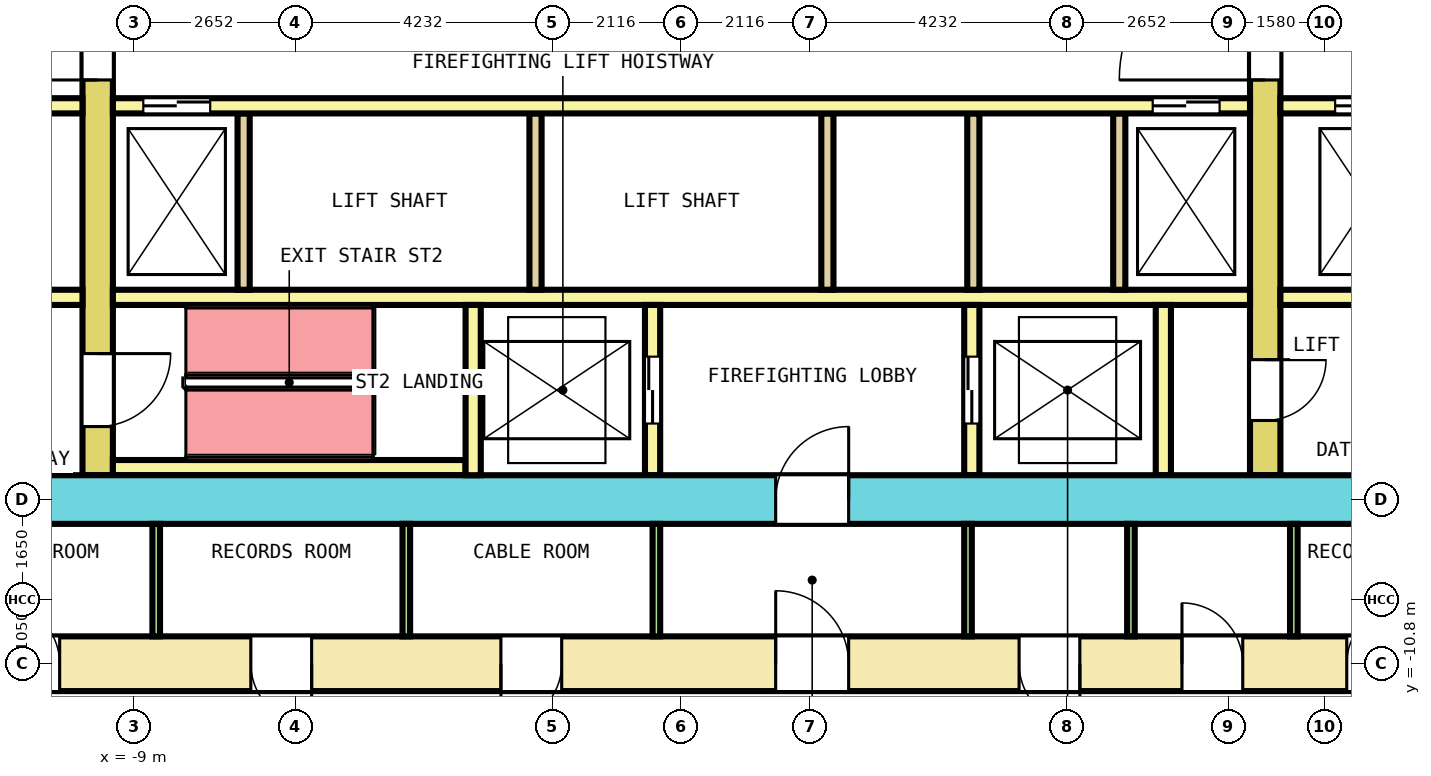
"""IFC4 building model, lengths in metres.
Left out: names, types, materials, properties, quantities, classifications, styles, units other than length and angle.
Written with IfcOpenShell. Run it as: python <this file> out.ifc"""

import sys

from ifc_helpers import new_model, si_unit, direction, frame, frame_2d, origin, place, context, subcontext, project, spatial, rectangle, extrude, element, fill, save


model = new_model("IFC4")
c1 = context("Model", 3, precision=1e-05, world=origin(), true_north=direction((0.0, 1.0)))
c2 = subcontext(c1, "Body", "Model", "MODEL_VIEW")
j1 = project(units=[si_unit("LENGTHUNIT", "METRE"), si_unit("PLANEANGLEUNIT", "RADIAN")], contexts=[c1])
p1 = place(None, origin())
s1 = spatial("IfcSite", under=j1, at=p1, CompositionType="ELEMENT")
p2 = place(p1, origin())
s2 = spatial("IfcBuilding", under=s1, at=p2, CompositionType="ELEMENT")
p3 = place(p2, frame((0.0, 0.0, 14.6)))
s3 = spatial("IfcBuildingStorey", under=s2, at=p3, CompositionType="ELEMENT", Elevation=14.6)
p4 = place(p3, frame((-13.65, -10.8, 0.0), z_axis=(0.0, 0.0, 1.0), x_axis=(1.0, 0.0, 0.0)))
e1 = element("IfcWall", 1, at=p4, inside=s3, PredefinedType="SHEAR", context=c2, shape_type="SweptSolid", body=[
    extrude(rectangle(XDim=27.3, YDim=0.9, at=frame_2d((13.65, 0.0))), origin(), (0.0, 0.0, 1.0), 4.1),
])
p5 = place(p4, frame((2.425, 0.0, 0.0)))
e2 = element("IfcOpeningElement", 2, at=p5, cuts=e1, PredefinedType="OPENING", context=c2, shape_type="SweptSolid", body=[
    extrude(rectangle(XDim=1.0, YDim=2.1, at=frame_2d((0.5, 1.05))), frame((0.0, 0.46, 0.0), z_axis=(0.0, -1.0, 0.0), x_axis=(1.0, 0.0, 0.0)), (0.0, 0.0, 1.0), 0.92),
])
p6 = place(p4, frame((6.569, 0.0, 0.0)))
e3 = element("IfcOpeningElement", 3, at=p6, cuts=e1, PredefinedType="OPENING", context=c2, shape_type="SweptSolid", body=[
    extrude(rectangle(XDim=1.0, YDim=2.1, at=frame_2d((0.5, 1.05))), frame((0.0, 0.46, 0.0), z_axis=(0.0, -1.0, 0.0), x_axis=(1.0, 0.0, 0.0)), (0.0, 0.0, 1.0), 0.92),
])
p7 = place(p4, frame((10.681, 0.0, 0.0)))
e4 = element("IfcOpeningElement", 4, at=p7, cuts=e1, PredefinedType="OPENING", context=c2, shape_type="SweptSolid", body=[
    extrude(rectangle(XDim=1.0, YDim=2.1, at=frame_2d((0.5, 1.05))), frame((0.0, 0.46, 0.0), z_axis=(0.0, -1.0, 0.0), x_axis=(1.0, 0.0, 0.0)), (0.0, 0.0, 1.0), 0.92),
])
p8 = place(p4, frame((19.202, 0.0, 0.0)))
e5 = element("IfcOpeningElement", 5, at=p8, cuts=e1, PredefinedType="OPENING", context=c2, shape_type="SweptSolid", body=[
    extrude(rectangle(XDim=1.0, YDim=2.1, at=frame_2d((0.5, 1.05))), frame((0.0, 0.46, 0.0), z_axis=(0.0, -1.0, 0.0), x_axis=(1.0, 0.0, 0.0)), (0.0, 0.0, 1.0), 0.92),
])
p9 = place(p4, frame((21.881, 0.0, 0.0)))
e6 = element("IfcOpeningElement", 6, at=p9, cuts=e1, PredefinedType="OPENING", context=c2, shape_type="SweptSolid", body=[
    extrude(rectangle(XDim=1.0, YDim=2.1, at=frame_2d((0.5, 1.05))), frame((0.0, 0.46, 0.0), z_axis=(0.0, -1.0, 0.0), x_axis=(1.0, 0.0, 0.0)), (0.0, 0.0, 1.0), 0.92),
])
p10 = place(p4, frame((24.592, 0.0, 0.0)))
e7 = element("IfcOpeningElement", 7, at=p10, cuts=e1, PredefinedType="OPENING", context=c2, shape_type="SweptSolid", body=[
    extrude(rectangle(XDim=1.0, YDim=2.1, at=frame_2d((0.5, 1.05))), frame((0.0, 0.46, 0.0), z_axis=(0.0, -1.0, 0.0), x_axis=(1.0, 0.0, 0.0)), (0.0, 0.0, 1.0), 0.92),
])
p11 = place(p4, frame((15.2, 0.0, 0.0)))
e8 = element("IfcOpeningElement", 8, at=p11, cuts=e1, PredefinedType="OPENING", context=c2, shape_type="SweptSolid", body=[
    extrude(rectangle(XDim=1.2, YDim=2.1, at=frame_2d((0.6, 1.05))), frame((0.0, 0.46, 0.0), z_axis=(0.0, -1.0, 0.0), x_axis=(1.0, 0.0, 0.0)), (0.0, 0.0, 1.0), 0.92),
])
p12 = place(p3, frame((-12.75, -8.1, 0.0), z_axis=(0.0, 0.0, 1.0), x_axis=(1.0, 0.0, 0.0)))
e9 = element("IfcWall", 9, at=p12, inside=s3, PredefinedType="SHEAR", context=c2, shape_type="SweptSolid", body=[
    extrude(rectangle(XDim=25.5, YDim=0.8, at=frame_2d((12.75, 0.0))), origin(), (0.0, 0.0, 1.0), 4.1),
])
p13 = place(p12, frame((14.3, 0.0, 0.0)))
e10 = element("IfcOpeningElement", 10, at=p13, cuts=e9, PredefinedType="OPENING", context=c2, shape_type="SweptSolid", body=[
    extrude(rectangle(XDim=1.2, YDim=2.1, at=frame_2d((0.6, 1.05))), frame((0.0, 0.41, 0.0), z_axis=(0.0, -1.0, 0.0), x_axis=(1.0, 0.0, 0.0)), (0.0, 0.0, 1.0), 0.82),
])
p14 = place(p3, frame((-9.6, -7.7, 0.0), z_axis=(0.0, 0.0, 1.0), x_axis=(0.0, 1.0, 0.0)))
e11 = element("IfcWall", 11, at=p14, inside=s3, PredefinedType="SHEAR", context=c2, shape_type="SweptSolid", body=[
    extrude(rectangle(XDim=15.4, YDim=0.5, at=frame_2d((7.7, 0.0))), origin(), (0.0, 0.0, 1.0), 4.1),
])
p15 = place(p14, frame((6.5, 0.0, 0.0)))
e12 = element("IfcOpeningElement", 12, at=p15, cuts=e11, PredefinedType="OPENING", context=c2, shape_type="SweptSolid", body=[
    extrude(rectangle(XDim=2.4, YDim=2.1, at=frame_2d((1.2, 1.05))), frame((0.0, 0.26, 0.0), z_axis=(0.0, -1.0, 0.0), x_axis=(1.0, 0.0, 0.0)), (0.0, 0.0, 1.0), 0.52),
])
p16 = place(p14, frame((13.4, 0.0, 0.0)))
e13 = element("IfcOpeningElement", 13, at=p16, cuts=e11, PredefinedType="OPENING", context=c2, shape_type="SweptSolid", body=[
    extrude(rectangle(XDim=1.2, YDim=2.1, at=frame_2d((0.6, 1.05))), frame((0.0, 0.26, 0.0), z_axis=(0.0, -1.0, 0.0), x_axis=(1.0, 0.0, 0.0)), (0.0, 0.0, 1.0), 0.52),
])
p17 = place(p14, frame((0.8, 0.0, 0.0)))
e14 = element("IfcOpeningElement", 14, at=p17, cuts=e11, PredefinedType="OPENING", context=c2, shape_type="SweptSolid", body=[
    extrude(rectangle(XDim=1.2, YDim=2.1, at=frame_2d((0.6, 1.05))), frame((0.0, 0.26, 0.0), z_axis=(0.0, -1.0, 0.0), x_axis=(1.0, 0.0, 0.0)), (0.0, 0.0, 1.0), 0.52),
])
p18 = place(p3, frame((9.6, -7.7, 0.0), z_axis=(0.0, 0.0, 1.0), x_axis=(0.0, 1.0, 0.0)))
e15 = element("IfcWall", 15, at=p18, inside=s3, PredefinedType="SHEAR", context=c2, shape_type="SweptSolid", body=[
    extrude(rectangle(XDim=15.4, YDim=0.5, at=frame_2d((7.7, 0.0))), origin(), (0.0, 0.0, 1.0), 4.1),
])
p19 = place(p18, frame((6.5, 0.0, 0.0)))
e16 = element("IfcOpeningElement", 16, at=p19, cuts=e15, PredefinedType="OPENING", context=c2, shape_type="SweptSolid", body=[
    extrude(rectangle(XDim=2.4, YDim=2.1, at=frame_2d((1.2, 1.05))), frame((0.0, 0.26, 0.0), z_axis=(0.0, -1.0, 0.0), x_axis=(1.0, 0.0, 0.0)), (0.0, 0.0, 1.0), 0.52),
])
p20 = place(p18, frame((13.4, 0.0, 0.0)))
e17 = element("IfcOpeningElement", 17, at=p20, cuts=e15, PredefinedType="OPENING", context=c2, shape_type="SweptSolid", body=[
    extrude(rectangle(XDim=1.2, YDim=2.1, at=frame_2d((0.6, 1.05))), frame((0.0, 0.26, 0.0), z_axis=(0.0, -1.0, 0.0), x_axis=(1.0, 0.0, 0.0)), (0.0, 0.0, 1.0), 0.52),
])
p21 = place(p18, frame((0.9, 0.0, 0.0)))
e18 = element("IfcOpeningElement", 18, at=p21, cuts=e15, PredefinedType="OPENING", context=c2, shape_type="SweptSolid", body=[
    extrude(rectangle(XDim=1.0, YDim=2.1, at=frame_2d((0.5, 1.05))), frame((0.0, 0.26, 0.0), z_axis=(0.0, -1.0, 0.0), x_axis=(1.0, 0.0, 0.0)), (0.0, 0.0, 1.0), 0.52),
])
p22 = place(p3, frame((-12.75, -1.625, 0.0), z_axis=(0.0, 0.0, 1.0), x_axis=(1.0, 0.0, 0.0)))
e19 = element("IfcWall", 19, at=p22, inside=s3, PredefinedType="SOLIDWALL", context=c2, shape_type="SweptSolid", body=[
    extrude(rectangle(XDim=2.9, YDim=0.25, at=frame_2d((1.45, 0.0))), origin(), (0.0, 0.0, 1.0), 4.1),
])
p23 = place(p22, frame((0.9, 0.0, 0.0)))
e20 = element("IfcOpeningElement", 20, at=p23, cuts=e19, PredefinedType="OPENING", context=c2, shape_type="SweptSolid", body=[
    extrude(rectangle(XDim=1.1, YDim=2.1, at=frame_2d((0.55, 1.05))), frame((0.0, 0.135, 0.0), z_axis=(0.0, -1.0, 0.0), x_axis=(1.0, 0.0, 0.0)), (0.0, 0.0, 1.0), 0.27),
])
p24 = place(p3, frame((-9.35, -1.625, 0.0), z_axis=(0.0, 0.0, 1.0), x_axis=(1.0, 0.0, 0.0)))
e21 = element("IfcWall", 21, at=p24, inside=s3, PredefinedType="SOLIDWALL", context=c2, shape_type="SweptSolid", body=[
    extrude(rectangle(XDim=18.7, YDim=0.25, at=frame_2d((9.35, 0.0))), origin(), (0.0, 0.0, 1.0), 4.1),
])
p25 = place(p24, frame((0.5, 0.0, 0.0)))
e22 = element("IfcOpeningElement", 22, at=p25, cuts=e21, PredefinedType="OPENING", context=c2, shape_type="SweptSolid", body=[
    extrude(rectangle(XDim=1.1, YDim=2.1, at=frame_2d((0.55, 1.05))), frame((0.0, 0.135, 0.0), z_axis=(0.0, -1.0, 0.0), x_axis=(1.0, 0.0, 0.0)), (0.0, 0.0, 1.0), 0.27),
])
p26 = place(p24, frame((17.1, 0.0, 0.0)))
e23 = element("IfcOpeningElement", 23, at=p26, cuts=e21, PredefinedType="OPENING", context=c2, shape_type="SweptSolid", body=[
    extrude(rectangle(XDim=1.1, YDim=2.1, at=frame_2d((0.55, 1.05))), frame((0.0, 0.135, 0.0), z_axis=(0.0, -1.0, 0.0), x_axis=(1.0, 0.0, 0.0)), (0.0, 0.0, 1.0), 0.27),
])
p27 = place(p3, frame((9.85, -1.625, 0.0), z_axis=(0.0, 0.0, 1.0), x_axis=(1.0, 0.0, 0.0)))
e24 = element("IfcWall", 24, at=p27, inside=s3, PredefinedType="SOLIDWALL", context=c2, shape_type="SweptSolid", body=[
    extrude(rectangle(XDim=2.9, YDim=0.25, at=frame_2d((1.45, 0.0))), origin(), (0.0, 0.0, 1.0), 4.1),
])
p28 = place(p27, frame((0.9, 0.0, 0.0)))
e25 = element("IfcOpeningElement", 25, at=p28, cuts=e24, PredefinedType="OPENING", context=c2, shape_type="SweptSolid", body=[
    extrude(rectangle(XDim=1.1, YDim=2.1, at=frame_2d((0.55, 1.05))), frame((0.0, 0.135, 0.0), z_axis=(0.0, -1.0, 0.0), x_axis=(1.0, 0.0, 0.0)), (0.0, 0.0, 1.0), 0.27),
])
p29 = place(p3, frame((-12.75, -4.775, 0.0), z_axis=(0.0, 0.0, 1.0), x_axis=(1.0, 0.0, 0.0)))
e26 = element("IfcWall", 26, at=p29, inside=s3, PredefinedType="SOLIDWALL", context=c2, shape_type="SweptSolid", body=[
    extrude(rectangle(XDim=2.9, YDim=0.25, at=frame_2d((1.45, 0.0))), origin(), (0.0, 0.0, 1.0), 4.1),
])
p30 = place(p3, frame((-9.35, -4.775, 0.0), z_axis=(0.0, 0.0, 1.0), x_axis=(1.0, 0.0, 0.0)))
e27 = element("IfcWall", 27, at=p30, inside=s3, PredefinedType="SOLIDWALL", context=c2, shape_type="SweptSolid", body=[
    extrude(rectangle(XDim=18.7, YDim=0.25, at=frame_2d((9.35, 0.0))), origin(), (0.0, 0.0, 1.0), 4.1),
])
p31 = place(p3, frame((9.85, -4.775, 0.0), z_axis=(0.0, 0.0, 1.0), x_axis=(1.0, 0.0, 0.0)))
e28 = element("IfcWall", 28, at=p31, inside=s3, PredefinedType="SOLIDWALL", context=c2, shape_type="SweptSolid", body=[
    extrude(rectangle(XDim=2.9, YDim=0.25, at=frame_2d((1.45, 0.0))), origin(), (0.0, 0.0, 1.0), 4.1),
])
for number, where, z_axis, x_axis in (
    (29, (-7.2, -4.65, 0.0), (0.0, 0.0, 1.0), (0.0, 1.0, 0.0)),
    (30, (-2.4, -4.65, 0.0), (0.0, 0.0, 1.0), (0.0, 1.0, 0.0)),
    (31, (2.4, -4.65, 0.0), (0.0, 0.0, 1.0), (0.0, 1.0, 0.0)),
    (32, (4.8, -4.65, 0.0), (0.0, 0.0, 1.0), (0.0, 1.0, 0.0)),
    (33, (7.2, -4.65, 0.0), (0.0, 0.0, 1.0), (0.0, 1.0, 0.0)),
):
    element("IfcWall", number, at=place(p3, frame(where, z_axis=z_axis, x_axis=x_axis)), inside=s3, PredefinedType="SOLIDWALL", context=c2, shape_type="SweptSolid", body=[
        extrude(rectangle(XDim=2.9, YDim=0.2, at=frame_2d((1.45, 0.0))), origin(), (0.0, 0.0, 1.0), 4.1),
    ])
p32 = place(p3, frame((-9.35, -7.575, 0.0), z_axis=(0.0, 0.0, 1.0), x_axis=(1.0, 0.0, 0.0)))
e34 = element("IfcWall", 34, at=p32, inside=s3, PredefinedType="SOLIDWALL", context=c2, shape_type="SweptSolid", body=[
    extrude(rectangle(XDim=5.8, YDim=0.25, at=frame_2d((2.9, 0.0))), origin(), (0.0, 0.0, 1.0), 4.1),
])
p33 = place(p3, frame((-3.425, -7.7, 0.0), z_axis=(0.0, 0.0, 1.0), x_axis=(0.0, 1.0, 0.0)))
e35 = element("IfcWall", 35, at=p33, inside=s3, PredefinedType="SOLIDWALL", context=c2, shape_type="SweptSolid", body=[
    extrude(rectangle(XDim=2.8, YDim=0.25, at=frame_2d((1.4, 0.0))), origin(), (0.0, 0.0, 1.0), 4.1),
])
p34 = place(p3, frame((-0.475, -7.7, 0.0), z_axis=(0.0, 0.0, 1.0), x_axis=(0.0, 1.0, 0.0)))
e36 = element("IfcWall", 36, at=p34, inside=s3, PredefinedType="SOLIDWALL", context=c2, shape_type="SweptSolid", body=[
    extrude(rectangle(XDim=2.8, YDim=0.25, at=frame_2d((1.4, 0.0))), origin(), (0.0, 0.0, 1.0), 4.1),
])
p35 = place(p34, frame((0.85, 0.0, 0.0)))
e37 = element("IfcOpeningElement", 37, at=p35, cuts=e36, PredefinedType="OPENING", context=c2, shape_type="SweptSolid", body=[
    extrude(rectangle(XDim=1.1, YDim=2.1, at=frame_2d((0.55, 1.05))), frame((0.0, 0.135, 0.0), z_axis=(0.0, -1.0, 0.0), x_axis=(1.0, 0.0, 0.0)), (0.0, 0.0, 1.0), 0.27),
])
p36 = place(p3, frame((4.775, -7.7, 0.0), z_axis=(0.0, 0.0, 1.0), x_axis=(0.0, 1.0, 0.0)))
e38 = element("IfcWall", 38, at=p36, inside=s3, PredefinedType="SOLIDWALL", context=c2, shape_type="SweptSolid", body=[
    extrude(rectangle(XDim=2.8, YDim=0.25, at=frame_2d((1.4, 0.0))), origin(), (0.0, 0.0, 1.0), 4.1),
])
p37 = place(p36, frame((0.85, 0.0, 0.0)))
e39 = element("IfcOpeningElement", 39, at=p37, cuts=e38, PredefinedType="OPENING", context=c2, shape_type="SweptSolid", body=[
    extrude(rectangle(XDim=1.1, YDim=2.1, at=frame_2d((0.55, 1.05))), frame((0.0, 0.135, 0.0), z_axis=(0.0, -1.0, 0.0), x_axis=(1.0, 0.0, 0.0)), (0.0, 0.0, 1.0), 0.27),
])
p38 = place(p3, frame((7.925, -7.7, 0.0), z_axis=(0.0, 0.0, 1.0), x_axis=(0.0, 1.0, 0.0)))
e40 = element("IfcWall", 40, at=p38, inside=s3, PredefinedType="SOLIDWALL", context=c2, shape_type="SweptSolid", body=[
    extrude(rectangle(XDim=2.8, YDim=0.25, at=frame_2d((1.4, 0.0))), origin(), (0.0, 0.0, 1.0), 4.1),
])
for number, where, z_axis, x_axis in (
    (41, (-8.637, -10.35, 0.0), (0.0, 0.0, 1.0), (0.0, 1.0, 0.0)),
    (42, (-4.525, -10.35, 0.0), (0.0, 0.0, 1.0), (0.0, 1.0, 0.0)),
    (43, (-0.413, -10.35, 0.0), (0.0, 0.0, 1.0), (0.0, 1.0, 0.0)),
    (44, (4.712, -10.35, 0.0), (0.0, 0.0, 1.0), (0.0, 1.0, 0.0)),
    (45, (7.392, -10.35, 0.0), (0.0, 0.0, 1.0), (0.0, 1.0, 0.0)),
    (46, (10.071, -10.35, 0.0), (0.0, 0.0, 1.0), (0.0, 1.0, 0.0)),
):
    element("IfcWall", number, at=place(p3, frame(where, z_axis=z_axis, x_axis=x_axis)), inside=s3, PredefinedType="PARTITIONING", context=c2, shape_type="SweptSolid", body=[
        extrude(rectangle(XDim=1.85, YDim=0.125, at=frame_2d((0.925, 0.0))), origin(), (0.0, 0.0, 1.0), 4.1),
    ])
p39 = place(p25, origin())
e47 = element("IfcDoor", 47, at=p39, inside=s3, OperationType="DOUBLE_DOOR_SLIDING", PredefinedType="DOOR", context=c2, shape_type="SweptSolid", body=[
    extrude(rectangle(XDim=1.1, YDim=2.1, at=frame_2d((0.55, 1.05))), frame((0.0, 0.075, 0.0), z_axis=(0.0, -1.0, 0.0), x_axis=(1.0, 0.0, 0.0)), (0.0, 0.0, 1.0), 0.15),
])
fill(e22, e47)
p40 = place(p26, origin())
e48 = element("IfcDoor", 48, at=p40, inside=s3, OperationType="DOUBLE_DOOR_SLIDING", PredefinedType="DOOR", context=c2, shape_type="SweptSolid", body=[
    extrude(rectangle(XDim=1.1, YDim=2.1, at=frame_2d((0.55, 1.05))), frame((0.0, 0.075, 0.0), z_axis=(0.0, -1.0, 0.0), x_axis=(1.0, 0.0, 0.0)), (0.0, 0.0, 1.0), 0.15),
])
fill(e23, e48)
p41 = place(p28, origin())
e49 = element("IfcDoor", 49, at=p41, inside=s3, OperationType="DOUBLE_DOOR_SLIDING", PredefinedType="DOOR", context=c2, shape_type="SweptSolid", body=[
    extrude(rectangle(XDim=1.1, YDim=2.1, at=frame_2d((0.55, 1.05))), frame((0.0, 0.075, 0.0), z_axis=(0.0, -1.0, 0.0), x_axis=(1.0, 0.0, 0.0)), (0.0, 0.0, 1.0), 0.15),
])
fill(e25, e49)
p42 = place(p35, origin())
e50 = element("IfcDoor", 50, at=p42, inside=s3, OperationType="DOUBLE_DOOR_SLIDING", PredefinedType="DOOR", context=c2, shape_type="SweptSolid", body=[
    extrude(rectangle(XDim=1.1, YDim=2.1, at=frame_2d((0.55, 1.05))), frame((0.0, 0.075, 0.0), z_axis=(0.0, -1.0, 0.0), x_axis=(1.0, 0.0, 0.0)), (0.0, 0.0, 1.0), 0.15),
])
fill(e37, e50)
p43 = place(p37, origin())
e51 = element("IfcDoor", 51, at=p43, inside=s3, OperationType="DOUBLE_DOOR_SLIDING", PredefinedType="DOOR", context=c2, shape_type="SweptSolid", body=[
    extrude(rectangle(XDim=1.1, YDim=2.1, at=frame_2d((0.55, 1.05))), frame((0.0, 0.075, 0.0), z_axis=(0.0, -1.0, 0.0), x_axis=(1.0, 0.0, 0.0)), (0.0, 0.0, 1.0), 0.15),
])
fill(e39, e51)
p44 = place(p15, origin())
e52 = element("IfcDoor", 52, at=p44, inside=s3, OperationType="DOUBLE_DOOR_SINGLE_SWING", PredefinedType="DOOR", context=c2, shape_type="SweptSolid", body=[
    extrude(rectangle(XDim=2.4, YDim=2.1, at=frame_2d((1.2, 1.05))), frame((0.0, 0.2, 0.0), z_axis=(0.0, -1.0, 0.0), x_axis=(1.0, 0.0, 0.0)), (0.0, 0.0, 1.0), 0.4),
])
fill(e12, e52)
p45 = place(p19, origin())
e53 = element("IfcDoor", 53, at=p45, inside=s3, OperationType="DOUBLE_DOOR_SINGLE_SWING", PredefinedType="DOOR", context=c2, shape_type="SweptSolid", body=[
    extrude(rectangle(XDim=2.4, YDim=2.1, at=frame_2d((1.2, 1.05))), frame((0.0, 0.2, 0.0), z_axis=(0.0, -1.0, 0.0), x_axis=(1.0, 0.0, 0.0)), (0.0, 0.0, 1.0), 0.4),
])
fill(e16, e53)
p46 = place(p17, origin())
e54 = element("IfcDoor", 54, at=p46, inside=s3, OperationType="SINGLE_SWING_LEFT", PredefinedType="DOOR", context=c2, shape_type="SweptSolid", body=[
    extrude(rectangle(XDim=1.2, YDim=2.1, at=frame_2d((0.6, 1.05))), frame((0.0, 0.2, 0.0), z_axis=(0.0, -1.0, 0.0), x_axis=(1.0, 0.0, 0.0)), (0.0, 0.0, 1.0), 0.4),
])
fill(e14, e54)
p47 = place(p13, origin())
e55 = element("IfcDoor", 55, at=p47, inside=s3, OperationType="SINGLE_SWING_LEFT", PredefinedType="DOOR", context=c2, shape_type="SweptSolid", body=[
    extrude(rectangle(XDim=1.2, YDim=2.1, at=frame_2d((0.6, 1.05))), frame((0.0, 0.3, 0.0), z_axis=(0.0, -1.0, 0.0), x_axis=(1.0, 0.0, 0.0)), (0.0, 0.0, 1.0), 0.6),
])
fill(e10, e55)
p48 = place(p21, origin())
e56 = element("IfcDoor", 56, at=p48, inside=s3, OperationType="SINGLE_SWING_LEFT", PredefinedType="DOOR", context=c2, shape_type="SweptSolid", body=[
    extrude(rectangle(XDim=1.0, YDim=2.1, at=frame_2d((0.5, 1.05))), frame((0.0, 0.2, 0.0), z_axis=(0.0, -1.0, 0.0), x_axis=(1.0, 0.0, 0.0)), (0.0, 0.0, 1.0), 0.4),
])
fill(e18, e56)
p49 = place(p5, origin())
e57 = element("IfcDoor", 57, at=p49, inside=s3, OperationType="SINGLE_SWING_LEFT", PredefinedType="DOOR", context=c2, shape_type="SweptSolid", body=[
    extrude(rectangle(XDim=1.0, YDim=2.1, at=frame_2d((0.5, 1.05))), frame((0.0, 0.3, 0.0), z_axis=(0.0, -1.0, 0.0), x_axis=(1.0, 0.0, 0.0)), (0.0, 0.0, 1.0), 0.6),
])
fill(e2, e57)
p50 = place(p6, origin())
e58 = element("IfcDoor", 58, at=p50, inside=s3, OperationType="SINGLE_SWING_RIGHT", PredefinedType="DOOR", context=c2, shape_type="SweptSolid", body=[
    extrude(rectangle(XDim=1.0, YDim=2.1, at=frame_2d((0.5, 1.05))), frame((0.0, 0.3, 0.0), z_axis=(0.0, -1.0, 0.0), x_axis=(1.0, 0.0, 0.0)), (0.0, 0.0, 1.0), 0.6),
])
fill(e3, e58)
p51 = place(p7, origin())
e59 = element("IfcDoor", 59, at=p51, inside=s3, OperationType="SINGLE_SWING_LEFT", PredefinedType="DOOR", context=c2, shape_type="SweptSolid", body=[
    extrude(rectangle(XDim=1.0, YDim=2.1, at=frame_2d((0.5, 1.05))), frame((0.0, 0.3, 0.0), z_axis=(0.0, -1.0, 0.0), x_axis=(1.0, 0.0, 0.0)), (0.0, 0.0, 1.0), 0.6),
])
fill(e4, e59)
p52 = place(p8, origin())
e60 = element("IfcDoor", 60, at=p52, inside=s3, OperationType="SINGLE_SWING_RIGHT", PredefinedType="DOOR", context=c2, shape_type="SweptSolid", body=[
    extrude(rectangle(XDim=1.0, YDim=2.1, at=frame_2d((0.5, 1.05))), frame((0.0, 0.3, 0.0), z_axis=(0.0, -1.0, 0.0), x_axis=(1.0, 0.0, 0.0)), (0.0, 0.0, 1.0), 0.6),
])
fill(e5, e60)
p53 = place(p9, origin())
e61 = element("IfcDoor", 61, at=p53, inside=s3, OperationType="SINGLE_SWING_LEFT", PredefinedType="DOOR", context=c2, shape_type="SweptSolid", body=[
    extrude(rectangle(XDim=1.0, YDim=2.1, at=frame_2d((0.5, 1.05))), frame((0.0, 0.3, 0.0), z_axis=(0.0, -1.0, 0.0), x_axis=(1.0, 0.0, 0.0)), (0.0, 0.0, 1.0), 0.6),
])
fill(e6, e61)
p54 = place(p10, origin())
e62 = element("IfcDoor", 62, at=p54, inside=s3, OperationType="SINGLE_SWING_RIGHT", PredefinedType="DOOR", context=c2, shape_type="SweptSolid", body=[
    extrude(rectangle(XDim=1.0, YDim=2.1, at=frame_2d((0.5, 1.05))), frame((0.0, 0.3, 0.0), z_axis=(0.0, -1.0, 0.0), x_axis=(1.0, 0.0, 0.0)), (0.0, 0.0, 1.0), 0.6),
])
fill(e7, e62)
p55 = place(p11, origin())
e63 = element("IfcDoor", 63, at=p55, inside=s3, OperationType="SINGLE_SWING_LEFT", PredefinedType="DOOR", context=c2, shape_type="SweptSolid", body=[
    extrude(rectangle(XDim=1.2, YDim=2.1, at=frame_2d((0.6, 1.05))), frame((0.0, 0.3, 0.0), z_axis=(0.0, -1.0, 0.0), x_axis=(1.0, 0.0, 0.0)), (0.0, 0.0, 1.0), 0.6),
])
fill(e8, e63)
save(model, sys.argv[1])
